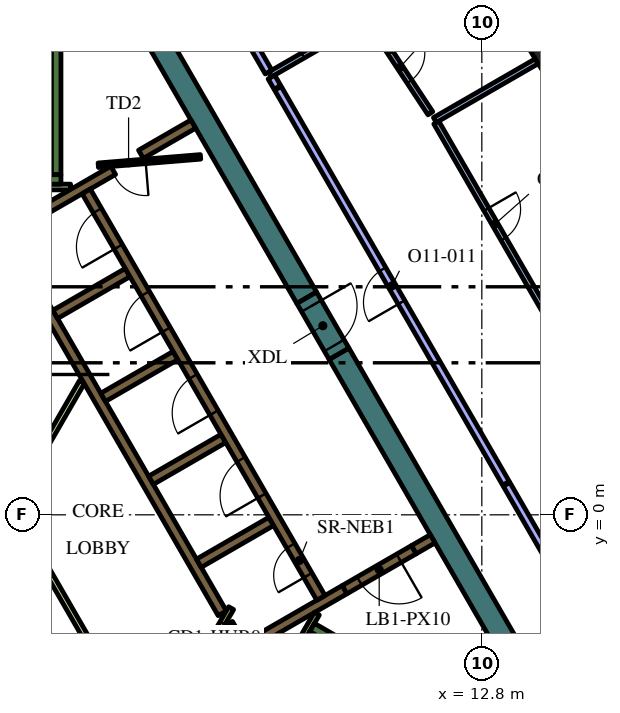
"""IFC4 building model, lengths in metres.
Left out: names, types, materials, properties, quantities, classifications, styles, units other than length and angle.
Written with IfcOpenShell. Run it as: python <this file> out.ifc"""

import sys

from ifc_helpers import new_model, si_unit, direction, frame, frame_2d, origin, origin_2d, place, context, subcontext, project, spatial, rectangle, extrude, element, fill, save


model = new_model("IFC4")
c1 = context("Model", 3, precision=1e-05, world=origin(), true_north=direction((0.0, 1.0)))
c2 = subcontext(c1, "Body", "Model", "MODEL_VIEW")
j1 = project(units=[si_unit("LENGTHUNIT", "METRE"), si_unit("PLANEANGLEUNIT", "RADIAN")], contexts=[c1])
p1 = place(None, origin())
s1 = spatial("IfcSite", under=j1, at=p1, CompositionType="ELEMENT")
p2 = place(p1, origin())
s2 = spatial("IfcBuilding", under=s1, at=p2, CompositionType="ELEMENT")
p3 = place(p2, frame((0.0, 0.0, 271.2)))
s3 = spatial("IfcBuildingStorey", under=s2, at=p3, CompositionType="ELEMENT", Elevation=271.2)
p4 = place(p3, frame((14.556, 12.098, 0.0), z_axis=(0.0, 0.0, 1.0), x_axis=(-0.525609744083, 0.850725805959, 0.0)))
e1 = element("IfcColumn", 1, at=p4, inside=s3, PredefinedType="COLUMN", context=c2, shape_type="SweptSolid", body=[
    extrude(rectangle(XDim=1.0, YDim=0.7, at=origin_2d()), origin(), (0.0, 0.0, 1.0), 4.2),
])
for number, where, z_axis, x_axis in (
    (2, (9.042, 4.239, 0.0), (0.0, 0.0, 1.0), (0.5, -0.866, 0.0)),
    (3, (1.989, 16.456, 0.0), (0.0, 0.0, 1.0), (0.5, -0.866, 0.0)),
):
    element("IfcWall", number, at=place(p3, frame(where, z_axis=z_axis, x_axis=x_axis)), inside=s3, PredefinedType="SOLIDWALL", context=c2, shape_type="SweptSolid", body=[
        extrude(rectangle(XDim=12.406, YDim=0.6, at=frame_2d((6.203, 0.0))), origin(), (0.0, 0.0, 1.0), 4.2),
    ])
p5 = place(p3, frame((8.334, -2.964, 0.0), z_axis=(0.0, 0.0, 1.0), x_axis=(0.866016039709, -0.500016218704, 0.0)))
e4 = element("IfcWall", 4, at=p5, inside=s3, PredefinedType="SOLIDWALL", context=c2, shape_type="SweptSolid", body=[
    extrude(rectangle(XDim=7.05, YDim=0.25, at=frame_2d((3.525, 0.0))), origin(), (0.0, 0.0, 1.0), 4.2),
])
p6 = place(p3, frame((8.168, -3.503, 0.0), z_axis=(0.0, 0.0, 1.0), x_axis=(0.49972245349, 0.866185586049, 0.0)))
e5 = element("IfcWall", 5, at=p6, inside=s3, PredefinedType="SOLIDWALL", context=c2, shape_type="SweptSolid", body=[
    extrude(rectangle(XDim=0.425, YDim=0.25, at=frame_2d((0.212, 0.0))), origin(), (0.0, 0.0, 1.0), 4.2),
])
p7 = place(p3, frame((1.6, 8.95, 0.0), z_axis=(0.0, 0.0, 1.0), x_axis=(0.0, 1.0, 0.0)))
e6 = element("IfcWall", 6, at=p7, inside=s3, PredefinedType="SOLIDWALL", context=c2, shape_type="SweptSolid", body=[
    extrude(rectangle(XDim=6.8, YDim=0.25, at=frame_2d((3.4, 0.0))), origin(), (0.0, 0.0, 1.0), 4.2),
])
p8 = place(p3, frame((1.05, 8.825, 0.0), z_axis=(0.0, 0.0, 1.0), x_axis=(1.0, 0.0, 0.0)))
e7 = element("IfcWall", 7, at=p8, inside=s3, PredefinedType="SOLIDWALL", context=c2, shape_type="SweptSolid", body=[
    extrude(rectangle(XDim=0.675, YDim=0.25, at=frame_2d((0.337, 0.0))), origin(), (0.0, 0.0, 1.0), 4.2),
])
p9 = place(p3, frame((9.19, -1.969, 0.0), z_axis=(0.0, 0.0, 1.0), x_axis=(-0.866057109641, -0.499945079824, 0.0)))
e8 = element("IfcWall", 8, at=p9, inside=s3, PredefinedType="SOLIDWALL", context=c2, shape_type="SweptSolid", body=[
    extrude(rectangle(XDim=3.291, YDim=0.25, at=frame_2d((1.646, 0.0))), origin(), (0.0, 0.0, 1.0), 4.2),
])
p10 = place(p3, frame((6.13, -2.867, 0.0), z_axis=(0.0, 0.0, 1.0), x_axis=(0.500160776593, -0.865932559475, 0.0)))
e9 = element("IfcWall", 9, at=p10, inside=s3, PredefinedType="SOLIDWALL", context=c2, shape_type="SweptSolid", body=[
    extrude(rectangle(XDim=0.627, YDim=0.25, at=frame_2d((0.313, 0.0))), origin(), (0.0, 0.0, 1.0), 4.2),
])
p11 = place(p3, frame((11.507, -0.631, 0.0), z_axis=(0.0, 0.0, 1.0), x_axis=(-0.866093731455, -0.499881634324, 0.0)))
e10 = element("IfcWall", 10, at=p11, inside=s3, PredefinedType="SOLIDWALL", context=c2, shape_type="SweptSolid", body=[
    extrude(rectangle(XDim=0.575, YDim=0.25, at=frame_2d((0.288, 0.0))), origin(), (0.0, 0.0, 1.0), 4.2),
])
p12 = place(p3, frame((3.1, 9.064, 0.0), z_axis=(0.0, 0.0, 1.0), x_axis=(-0.866033137035, -0.499986605379, 0.0)))
e11 = element("IfcWall", 11, at=p12, inside=s3, PredefinedType="SOLIDWALL", context=c2, shape_type="SweptSolid", body=[
    extrude(rectangle(XDim=3.467, YDim=0.25, at=frame_2d((1.733, 0.0))), origin(), (0.0, 0.0, 1.0), 4.2),
])
p13 = place(p3, frame((5.97, -2.591, 0.0), z_axis=(0.0, 0.0, 1.0), x_axis=(-0.499994469932, 0.866028596547, 0.0)))
e12 = element("IfcWall", 12, at=p13, inside=s3, PredefinedType="SOLIDWALL", context=c2, shape_type="SweptSolid", body=[
    extrude(rectangle(XDim=10.488, YDim=0.25, at=frame_2d((5.244, 0.0))), origin(), (0.0, 0.0, 1.0), 4.2),
])
p14 = place(p3, frame((1.574, 5.274, 0.0), z_axis=(0.0, 0.0, 1.0), x_axis=(0.866028486751, 0.499994660107, 0.0)))
e13 = element("IfcWall", 13, at=p14, inside=s3, PredefinedType="SOLIDWALL", context=c2, shape_type="SweptSolid", body=[
    extrude(rectangle(XDim=2.2, YDim=0.25, at=frame_2d((1.1, 0.0))), origin(), (0.0, 0.0, 1.0), 4.2),
])
for number, where, z_axis, x_axis in (
    (14, (2.834, 3.091, 0.0), (0.0, 0.0, 1.0), (0.866, 0.5, 0.0)),
    (15, (4.094, 0.909, 0.0), (0.0, 0.0, 1.0), (0.866, 0.5, 0.0)),
    (16, (5.354, -1.274, 0.0), (0.0, 0.0, 1.0), (0.866, 0.5, 0.0)),
):
    element("IfcWall", number, at=place(p3, frame(where, z_axis=z_axis, x_axis=x_axis)), inside=s3, PredefinedType="SOLIDWALL", context=c2, shape_type="SweptSolid", body=[
        extrude(rectangle(XDim=2.2, YDim=0.25, at=frame_2d((1.1, 0.0))), origin(), (0.0, 0.0, 1.0), 4.2),
    ])
p15 = place(p3, frame((3.83, 9.486, 0.0), z_axis=(0.0, 0.0, 1.0), x_axis=(0.865986202621, 0.500067892261, 0.0)))
e17 = element("IfcWall", 17, at=p15, inside=s3, PredefinedType="SOLIDWALL", context=c2, shape_type="SweptSolid", body=[
    extrude(rectangle(XDim=1.591, YDim=0.25, at=frame_2d((0.795, 0.0))), origin(), (0.0, 0.0, 1.0), 4.2),
])
p16 = place(p3, frame((1.05, 8.625, 0.0), z_axis=(0.0, 0.0, 1.0), x_axis=(1.0, 0.0, 0.0)))
e18 = element("IfcWall", 18, at=p16, inside=s3, PredefinedType="PARTITIONING", context=c2, shape_type="SweptSolid", body=[
    extrude(rectangle(XDim=0.929, YDim=0.15, at=frame_2d((0.464, 0.0))), origin(), (0.0, 0.0, 1.0), 3.55),
])
p17 = place(p3, frame((8.459, -2.599, 0.0), z_axis=(0.0, 0.0, 1.0), x_axis=(-0.500041054325, -0.866001699761, 0.0)))
e19 = element("IfcWall", 19, at=p17, inside=s3, PredefinedType="PARTITIONING", context=c2, shape_type="SweptSolid", body=[
    extrude(rectangle(XDim=0.929, YDim=0.15, at=frame_2d((0.464, 0.0))), origin(), (0.0, 0.0, 1.0), 4.2),
])
p18 = place(p3, frame((-1.887, 4.168, 0.0), z_axis=(0.0, 0.0, 1.0), x_axis=(0.499997069472, -0.866027095719, 0.0)))
e20 = element("IfcWall", 20, at=p18, inside=s3, PredefinedType="PARTITIONING", context=c2, shape_type="SweptSolid", body=[
    extrude(rectangle(XDim=9.106, YDim=0.15, at=frame_2d((4.553, 0.0))), origin(), (0.0, 0.0, 1.0), 3.55),
])
p19 = place(p3, frame((2.277, 3.493, 0.0), z_axis=(0.0, 0.0, 1.0), x_axis=(-0.499994550825, -0.866028549844, 0.0)))
e21 = element("IfcWall", 21, at=p19, inside=s3, PredefinedType="PARTITIONING", context=c2, shape_type="SweptSolid", body=[
    extrude(rectangle(XDim=3.65, YDim=0.15, at=frame_2d((1.825, 0.0))), origin(), (0.0, 0.0, 1.0), 3.55),
])
p20 = place(p3, frame((8.565, -2.185, 0.0), z_axis=(0.0, 0.0, 1.0), x_axis=(-0.499997954832, 0.866026584559, 0.0)))
e22 = element("IfcWall", 22, at=p20, inside=s3, PredefinedType="SOLIDWALL", context=c2, shape_type="SweptSolid", body=[
    extrude(rectangle(XDim=12.35, YDim=0.25, at=frame_2d((6.175, 0.0))), origin(), (0.0, 0.0, 1.0), 4.2),
])
p21 = place(p20, frame((0.685, 0.0, 0.0)))
e23 = element("IfcOpeningElement", 23, at=p21, cuts=e22, PredefinedType="OPENING", context=c2, shape_type="SweptSolid", body=[
    extrude(rectangle(XDim=0.9, YDim=2.1, at=frame_2d((0.45, 1.05))), frame((0.0, 0.135, 0.0), z_axis=(0.0, -1.0, 0.0), x_axis=(1.0, 0.0, 0.0)), (0.0, 0.0, 1.0), 0.27),
])
p22 = place(p20, frame((3.105, 0.0, 0.0)))
e24 = element("IfcOpeningElement", 24, at=p22, cuts=e22, PredefinedType="OPENING", context=c2, shape_type="SweptSolid", body=[
    extrude(rectangle(XDim=1.1, YDim=2.1, at=frame_2d((0.55, 1.05))), frame((0.0, 0.135, 0.0), z_axis=(0.0, -1.0, 0.0), x_axis=(1.0, 0.0, 0.0)), (0.0, 0.0, 1.0), 0.27),
])
p23 = place(p20, frame((5.625, 0.0, 0.0)))
e25 = element("IfcOpeningElement", 25, at=p23, cuts=e22, PredefinedType="OPENING", context=c2, shape_type="SweptSolid", body=[
    extrude(rectangle(XDim=1.1, YDim=2.1, at=frame_2d((0.55, 1.05))), frame((0.0, 0.135, 0.0), z_axis=(0.0, -1.0, 0.0), x_axis=(1.0, 0.0, 0.0)), (0.0, 0.0, 1.0), 0.27),
])
p24 = place(p20, frame((8.145, 0.0, 0.0)))
e26 = element("IfcOpeningElement", 26, at=p24, cuts=e22, PredefinedType="OPENING", context=c2, shape_type="SweptSolid", body=[
    extrude(rectangle(XDim=1.1, YDim=2.1, at=frame_2d((0.55, 1.05))), frame((0.0, 0.135, 0.0), z_axis=(0.0, -1.0, 0.0), x_axis=(1.0, 0.0, 0.0)), (0.0, 0.0, 1.0), 0.27),
])
p25 = place(p20, frame((10.665, 0.0, 0.0)))
e27 = element("IfcOpeningElement", 27, at=p25, cuts=e22, PredefinedType="OPENING", context=c2, shape_type="SweptSolid", body=[
    extrude(rectangle(XDim=1.1, YDim=2.1, at=frame_2d((0.55, 1.05))), frame((0.0, 0.135, 0.0), z_axis=(0.0, -1.0, 0.0), x_axis=(1.0, 0.0, 0.0)), (0.0, 0.0, 1.0), 0.27),
])
p26 = place(p3, frame((5.398, 9.419, 0.0), z_axis=(0.0, 0.0, 1.0), x_axis=(-0.996653416376, -0.081743303248, 0.0)))
e28 = element("IfcWall", 28, at=p26, inside=s3, PredefinedType="PARTITIONING", context=c2, shape_type="SweptSolid", body=[
    extrude(rectangle(XDim=2.7, YDim=0.12, at=frame_2d((1.35, 0.0))), origin(), (0.0, 0.0, 1.0), 3.55),
])
p27 = place(p26, frame((1.45, 0.0, 0.0)))
e29 = element("IfcOpeningElement", 29, at=p27, cuts=e28, PredefinedType="OPENING", context=c2, shape_type="SweptSolid", body=[
    extrude(rectangle(XDim=0.9, YDim=2.1, at=frame_2d((0.45, 1.05))), frame((0.0, 0.07, 0.0), z_axis=(0.0, -1.0, 0.0), x_axis=(1.0, 0.0, 0.0)), (0.0, 0.0, 1.0), 0.14),
])
p28 = place(p3, frame((6.203, -2.456, 0.0), z_axis=(0.0, 0.0, 1.0), x_axis=(-0.500043961785, -0.866000020948, 0.0)))
e30 = element("IfcWall", 30, at=p28, inside=s3, PredefinedType="PARTITIONING", context=c2, shape_type="SweptSolid", body=[
    extrude(rectangle(XDim=1.95, YDim=0.15, at=frame_2d((0.975, 0.0))), origin(), (0.0, 0.0, 1.0), 4.2),
])
p29 = place(p28, frame((0.45, 0.0, 0.0)))
e31 = element("IfcOpeningElement", 31, at=p29, cuts=e30, PredefinedType="OPENING", context=c2, shape_type="SweptSolid", body=[
    extrude(rectangle(XDim=0.9, YDim=2.1, at=frame_2d((0.45, 1.05))), frame((0.0, 0.085, 0.0), z_axis=(0.0, -1.0, 0.0), x_axis=(1.0, 0.0, 0.0)), (0.0, 0.0, 1.0), 0.17),
])
p30 = place(p3, frame((11.009, -0.919, 0.0), z_axis=(0.0, 0.0, 1.0), x_axis=(-0.866059744384, -0.49994051562, 0.0)))
e32 = element("IfcWall", 32, at=p30, inside=s3, PredefinedType="SOLIDWALL", context=c2, shape_type="SweptSolid", body=[
    extrude(rectangle(XDim=2.1, YDim=0.25, at=frame_2d((1.05, 0.0))), origin(), (0.0, 0.0, 1.0), 4.2),
])
p31 = place(p30, frame((0.45, 0.0, 0.0)))
e33 = element("IfcOpeningElement", 33, at=p31, cuts=e32, PredefinedType="OPENING", context=c2, shape_type="SweptSolid", body=[
    extrude(rectangle(XDim=1.2, YDim=2.1, at=frame_2d((0.6, 1.05))), frame((0.0, 0.135, 0.0), z_axis=(0.0, -1.0, 0.0), x_axis=(1.0, 0.0, 0.0)), (0.0, 0.0, 1.0), 0.27),
])
p32 = place(p3, frame((8.192, 5.711, 0.0), z_axis=(0.0, 0.0, 1.0), x_axis=(0.500062241894, -0.865989465428, 0.0)))
e34 = element("IfcWall", 34, at=p32, inside=s3, PredefinedType="SOLIDWALL", context=c2, shape_type="SweptSolid", body=[
    extrude(rectangle(XDim=1.7, YDim=0.6, at=frame_2d((0.85, 0.0))), origin(), (0.0, 0.0, 1.0), 4.2),
])
p33 = place(p32, frame((0.25, 0.0, 0.0)))
e35 = element("IfcOpeningElement", 35, at=p33, cuts=e34, PredefinedType="OPENING", context=c2, shape_type="SweptSolid", body=[
    extrude(rectangle(XDim=1.2, YDim=2.1, at=frame_2d((0.6, 1.05))), frame((0.0, 0.31, 0.0), z_axis=(0.0, -1.0, 0.0), x_axis=(1.0, 0.0, 0.0)), (0.0, 0.0, 1.0), 0.62),
])
p34 = place(p3, frame((11.564, 10.387, 0.0), z_axis=(0.0, 0.0, 1.0), x_axis=(0.86604641216, 0.499963610661, 0.0)))
e36 = element("IfcWall", 36, at=p34, inside=s3, PredefinedType="PARTITIONING", context=c2, shape_type="SweptSolid", body=[
    extrude(rectangle(XDim=3.096, YDim=0.15, at=frame_2d((1.548, 0.0))), origin(), (0.0, 0.0, 1.0), 3.55),
])
p35 = place(p3, frame((11.602, 10.322, 0.0), z_axis=(0.0, 0.0, 1.0), x_axis=(0.499989914735, -0.866031226437, 0.0)))
e37 = element("IfcWall", 37, at=p35, inside=s3, PredefinedType="PARTITIONING", context=c2, shape_type="SweptSolid", body=[
    extrude(rectangle(XDim=6.137, YDim=0.15, at=frame_2d((3.068, 0.0))), origin(), (0.0, 0.0, 1.0), 3.55),
])
p36 = place(p35, frame((2.637, 0.0, 0.0)))
e38 = element("IfcOpeningElement", 38, at=p36, cuts=e37, PredefinedType="OPENING", context=c2, shape_type="SweptSolid", body=[
    extrude(rectangle(XDim=0.9, YDim=2.1, at=frame_2d((0.45, 1.05))), frame((0.0, 0.085, 0.0), z_axis=(0.0, -1.0, 0.0), x_axis=(1.0, 0.0, 0.0)), (0.0, 0.0, 1.0), 0.17),
])
p37 = place(p3, frame((9.795, 13.068, 0.0), z_axis=(0.0, 0.0, 1.0), x_axis=(0.550767347659, -0.834658809786, 0.0)))
e39 = element("IfcWall", 39, at=p37, inside=s3, PredefinedType="PARTITIONING", context=c2, shape_type="SweptSolid", body=[
    extrude(rectangle(XDim=2.999, YDim=0.15, at=frame_2d((1.5, 0.0))), origin(), (0.0, 0.0, 1.0), 3.55),
])
p38 = place(p37, frame((1.099, 0.0, 0.0)))
e40 = element("IfcOpeningElement", 40, at=p38, cuts=e39, PredefinedType="OPENING", context=c2, shape_type="SweptSolid", body=[
    extrude(rectangle(XDim=0.9, YDim=2.1, at=frame_2d((0.45, 1.05))), frame((0.0, 0.085, 0.0), z_axis=(0.0, -1.0, 0.0), x_axis=(1.0, 0.0, 0.0)), (0.0, 0.0, 1.0), 0.17),
])
p39 = place(p3, frame((7.226, 11.585, 0.0), z_axis=(0.0, 0.0, 1.0), x_axis=(0.866021079084, 0.500007490527, 0.0)))
e41 = element("IfcWall", 41, at=p39, inside=s3, PredefinedType="PARTITIONING", context=c2, shape_type="SweptSolid", body=[
    extrude(rectangle(XDim=2.892, YDim=0.15, at=frame_2d((1.446, 0.0))), origin(), (0.0, 0.0, 1.0), 3.55),
])
p40 = place(p39, frame((1.0, 0.0, 0.0)))
e42 = element("IfcOpeningElement", 42, at=p40, cuts=e41, PredefinedType="OPENING", context=c2, shape_type="SweptSolid", body=[
    extrude(rectangle(XDim=0.9, YDim=2.1, at=frame_2d((0.45, 1.05))), frame((0.0, 0.085, 0.0), z_axis=(0.0, -1.0, 0.0), x_axis=(1.0, 0.0, 0.0)), (0.0, 0.0, 1.0), 0.17),
])
p41 = place(p3, frame((13.436, 0.829, 0.0), z_axis=(0.0, 0.0, 1.0), x_axis=(-0.49999894854, 0.866026010844, 0.0)))
e43 = element("IfcWall", 43, at=p41, inside=s3, PredefinedType="PARTITIONING", context=c2, shape_type="SweptSolid", body=[
    extrude(rectangle(XDim=12.0, YDim=0.2, at=frame_2d((6.0, 0.0))), origin(), (0.0, 0.0, 1.0), 3.55),
])
p42 = place(p41, frame((5.5, 0.0, 0.0)))
e44 = element("IfcOpeningElement", 44, at=p42, cuts=e43, PredefinedType="OPENING", context=c2, shape_type="SweptSolid", body=[
    extrude(rectangle(XDim=1.0, YDim=2.1, at=frame_2d((0.5, 1.05))), frame((0.0, 0.11, 0.0), z_axis=(0.0, -1.0, 0.0), x_axis=(1.0, 0.0, 0.0)), (0.0, 0.0, 1.0), 0.22),
])
p43 = place(p3, frame((7.421, 11.247, 0.0), z_axis=(0.0, 0.0, 1.0), x_axis=(-0.500303403544, 0.865850162789, 0.0)))
e45 = element("IfcWall", 45, at=p43, inside=s3, PredefinedType="PARTITIONING", context=c2, shape_type="SweptSolid", body=[
    extrude(rectangle(XDim=0.315, YDim=0.2, at=frame_2d((0.158, 0.0))), origin(), (0.0, 0.0, 1.0), 3.55),
])
p44 = place(p3, frame((17.565, -6.324, 0.0), z_axis=(0.0, 0.0, 1.0), x_axis=(-0.499977548053, 0.866038366034, 0.0)))
e46 = element("IfcWall", 46, at=p44, inside=s3, PredefinedType="PARTITIONING", context=c2, shape_type="SweptSolid", body=[
    extrude(rectangle(XDim=8.229, YDim=0.2, at=frame_2d((4.115, 0.0))), origin(), (0.0, 0.0, 1.0), 3.55),
])
p45 = place(p3, frame((7.188, 11.65, 0.0), z_axis=(0.0, 0.0, 1.0), x_axis=(-0.499989634868, 0.866031388014, 0.0)))
e47 = element("IfcWall", 47, at=p45, inside=s3, PredefinedType="PARTITIONING", context=c2, shape_type="SweptSolid", body=[
    extrude(rectangle(XDim=7.303, YDim=0.2, at=frame_2d((3.652, 0.0))), origin(), (0.0, 0.0, 1.0), 3.55),
])
p46 = place(p21, origin())
e48 = element("IfcDoor", 48, at=p46, inside=s3, OperationType="SINGLE_SWING_LEFT", PredefinedType="DOOR", context=c2, shape_type="SweptSolid", body=[
    extrude(rectangle(XDim=0.9, YDim=2.1, at=frame_2d((0.45, 1.05))), frame((0.0, 0.025, 0.0), z_axis=(0.0, -1.0, 0.0), x_axis=(1.0, 0.0, 0.0)), (0.0, 0.0, 1.0), 0.05),
])
fill(e23, e48)
p47 = place(p22, origin())
e49 = element("IfcDoor", 49, at=p47, inside=s3, OperationType="DOUBLE_DOOR_SLIDING", PredefinedType="DOOR", context=c2, shape_type="SweptSolid", body=[
    extrude(rectangle(XDim=1.1, YDim=2.1, at=frame_2d((0.55, 1.05))), frame((0.0, 0.025, 0.0), z_axis=(0.0, -1.0, 0.0), x_axis=(1.0, 0.0, 0.0)), (0.0, 0.0, 1.0), 0.05),
])
fill(e24, e49)
p48 = place(p23, origin())
e50 = element("IfcDoor", 50, at=p48, inside=s3, OperationType="DOUBLE_DOOR_SLIDING", PredefinedType="DOOR", context=c2, shape_type="SweptSolid", body=[
    extrude(rectangle(XDim=1.1, YDim=2.1, at=frame_2d((0.55, 1.05))), frame((0.0, 0.025, 0.0), z_axis=(0.0, -1.0, 0.0), x_axis=(1.0, 0.0, 0.0)), (0.0, 0.0, 1.0), 0.05),
])
fill(e25, e50)
p49 = place(p24, origin())
e51 = element("IfcDoor", 51, at=p49, inside=s3, OperationType="DOUBLE_DOOR_SLIDING", PredefinedType="DOOR", context=c2, shape_type="SweptSolid", body=[
    extrude(rectangle(XDim=1.1, YDim=2.1, at=frame_2d((0.55, 1.05))), frame((0.0, 0.025, 0.0), z_axis=(0.0, -1.0, 0.0), x_axis=(1.0, 0.0, 0.0)), (0.0, 0.0, 1.0), 0.05),
])
fill(e26, e51)
p50 = place(p25, origin())
e52 = element("IfcDoor", 52, at=p50, inside=s3, OperationType="DOUBLE_DOOR_SLIDING", PredefinedType="DOOR", context=c2, shape_type="SweptSolid", body=[
    extrude(rectangle(XDim=1.1, YDim=2.1, at=frame_2d((0.55, 1.05))), frame((0.0, 0.025, 0.0), z_axis=(0.0, -1.0, 0.0), x_axis=(1.0, 0.0, 0.0)), (0.0, 0.0, 1.0), 0.05),
])
fill(e27, e52)
p51 = place(p27, origin())
e53 = element("IfcDoor", 53, at=p51, inside=s3, OperationType="SINGLE_SWING_LEFT", PredefinedType="DOOR", context=c2, shape_type="SweptSolid", body=[
    extrude(rectangle(XDim=0.9, YDim=2.1, at=frame_2d((0.45, 1.05))), frame((0.0, 0.025, 0.0), z_axis=(0.0, -1.0, 0.0), x_axis=(1.0, 0.0, 0.0)), (0.0, 0.0, 1.0), 0.05),
])
fill(e29, e53)
p52 = place(p29, origin())
e54 = element("IfcDoor", 54, at=p52, inside=s3, OperationType="SINGLE_SWING_LEFT", PredefinedType="DOOR", context=c2, shape_type="SweptSolid", body=[
    extrude(rectangle(XDim=0.9, YDim=2.1, at=frame_2d((0.45, 1.05))), frame((0.0, 0.025, 0.0), z_axis=(0.0, -1.0, 0.0), x_axis=(1.0, 0.0, 0.0)), (0.0, 0.0, 1.0), 0.05),
])
fill(e31, e54)
p53 = place(p31, origin())
e55 = element("IfcDoor", 55, at=p53, inside=s3, OperationType="SINGLE_SWING_LEFT", PredefinedType="DOOR", context=c2, shape_type="SweptSolid", body=[
    extrude(rectangle(XDim=1.2, YDim=2.1, at=frame_2d((0.6, 1.05))), frame((0.0, 0.025, 0.0), z_axis=(0.0, -1.0, 0.0), x_axis=(1.0, 0.0, 0.0)), (0.0, 0.0, 1.0), 0.05),
])
fill(e33, e55)
p54 = place(p33, origin())
e56 = element("IfcDoor", 56, at=p54, inside=s3, OperationType="SINGLE_SWING_LEFT", PredefinedType="DOOR", context=c2, shape_type="SweptSolid", body=[
    extrude(rectangle(XDim=1.2, YDim=2.1, at=frame_2d((0.6, 1.05))), frame((0.0, 0.025, 0.0), z_axis=(0.0, -1.0, 0.0), x_axis=(1.0, 0.0, 0.0)), (0.0, 0.0, 1.0), 0.05),
])
fill(e35, e56)
p55 = place(p36, origin())
e57 = element("IfcDoor", 57, at=p55, inside=s3, OperationType="SINGLE_SWING_RIGHT", PredefinedType="DOOR", context=c2, shape_type="SweptSolid", body=[
    extrude(rectangle(XDim=0.9, YDim=2.1, at=frame_2d((0.45, 1.05))), frame((0.0, 0.025, 0.0), z_axis=(0.0, -1.0, 0.0), x_axis=(1.0, 0.0, 0.0)), (0.0, 0.0, 1.0), 0.05),
])
fill(e38, e57)
p56 = place(p38, origin())
e58 = element("IfcDoor", 58, at=p56, inside=s3, OperationType="SINGLE_SWING_RIGHT", PredefinedType="DOOR", context=c2, shape_type="SweptSolid", body=[
    extrude(rectangle(XDim=0.9, YDim=2.1, at=frame_2d((0.45, 1.05))), frame((0.0, 0.025, 0.0), z_axis=(0.0, -1.0, 0.0), x_axis=(1.0, 0.0, 0.0)), (0.0, 0.0, 1.0), 0.05),
])
fill(e40, e58)
p57 = place(p42, origin())
e59 = element("IfcDoor", 59, at=p57, inside=s3, OperationType="SINGLE_SWING_RIGHT", PredefinedType="DOOR", context=c2, shape_type="SweptSolid", body=[
    extrude(rectangle(XDim=1.0, YDim=2.1, at=frame_2d((0.5, 1.05))), frame((0.0, 0.025, 0.0), z_axis=(0.0, -1.0, 0.0), x_axis=(1.0, 0.0, 0.0)), (0.0, 0.0, 1.0), 0.05),
])
fill(e44, e59)
p58 = place(p40, origin())
e60 = element("IfcDoor", 60, at=p58, inside=s3, OperationType="SINGLE_SWING_RIGHT", PredefinedType="DOOR", context=c2, shape_type="SweptSolid", body=[
    extrude(rectangle(XDim=0.9, YDim=2.1, at=frame_2d((0.45, 1.05))), frame((0.0, 0.025, 0.0), z_axis=(0.0, -1.0, 0.0), x_axis=(1.0, 0.0, 0.0)), (0.0, 0.0, 1.0), 0.05),
])
fill(e42, e60)
save(model, sys.argv[1])
